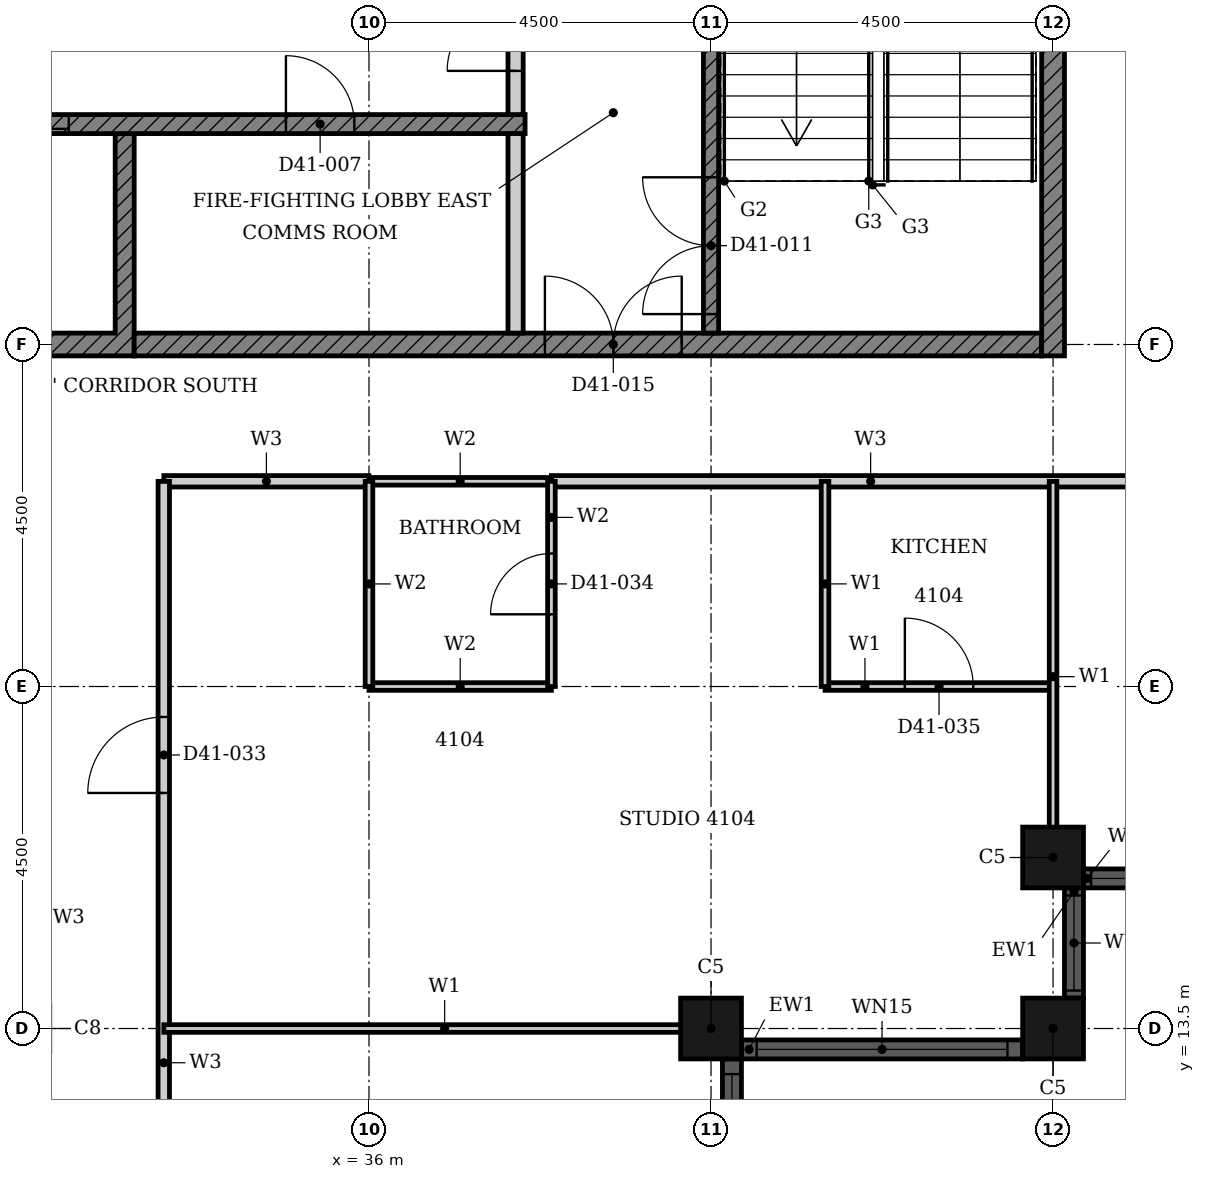
"""IFC4 building model, lengths in metres.
Left out: names, types, materials, properties, quantities, classifications, styles, units other than length and angle.
Written with IfcOpenShell. Run it as: python <this file> out.ifc"""

import sys

from ifc_helpers import new_model, si_unit, direction, frame, frame_2d, origin, origin_2d, place, context, subcontext, project, spatial, polyline, rectangle, hollow_rectangle, outline, extrude, element, fill, save


model = new_model("IFC4")
c1 = context("Model", 3, precision=1e-05, world=origin(), true_north=direction((0.0, 1.0)))
c2 = subcontext(c1, "Body", "Model", "MODEL_VIEW")
j1 = project(units=[si_unit("LENGTHUNIT", "METRE"), si_unit("PLANEANGLEUNIT", "RADIAN")], contexts=[c1])
p1 = place(None, origin())
s1 = spatial("IfcSite", under=j1, at=p1, CompositionType="ELEMENT")
p2 = place(p1, origin())
s2 = spatial("IfcBuilding", under=s1, at=p2, CompositionType="ELEMENT")
p3 = place(p2, frame((0.0, 0.0, 165.4)))
s3 = spatial("IfcBuildingStorey", under=s2, at=p3, CompositionType="ELEMENT", Elevation=165.4)
for number, where, z_axis, x_axis in (
    (1, (40.5, 13.5, 0.0), (0.0, 0.0, 1.0), (1.0, 0.0, 0.0)),
    (2, (45.0, 13.5, 0.0), (0.0, 0.0, 1.0), (1.0, 0.0, 0.0)),
    (3, (45.0, 15.75, 0.0), (0.0, 0.0, 1.0), (1.0, 0.0, 0.0)),
):
    element("IfcColumn", number, at=place(p3, frame(where, z_axis=z_axis, x_axis=x_axis)), inside=s3, PredefinedType="COLUMN", context=c2, shape_type="SweptSolid", body=[
        extrude(hollow_rectangle(XDim=0.8, YDim=0.8, WallThickness=0.025, at=origin_2d()), origin(), (0.0, 0.0, 1.0), 3.7),
    ])
p4 = place(p3, frame((40.775, 4.9, 0.0), z_axis=(0.0, 0.0, 1.0), x_axis=(0.0, 1.0, 0.0)))
e4 = element("IfcWall", 4, at=p4, inside=s3, PredefinedType="SOLIDWALL", context=c2, shape_type="SweptSolid", body=[
    extrude(rectangle(XDim=8.2, YDim=0.25, at=frame_2d((4.1, 0.0))), origin(), (0.0, 0.0, 1.0), 3.7),
])
p5 = place(p4, frame((0.2, 0.0, 0.45)))
e5 = element("IfcOpeningElement", 5, at=p5, cuts=e4, PredefinedType="OPENING", context=c2, shape_type="SweptSolid", body=[
    extrude(rectangle(XDim=3.3, YDim=2.3, at=frame_2d((1.65, 1.15))), frame((0.0, 0.135, 0.0), z_axis=(0.0, -1.0, 0.0), x_axis=(1.0, 0.0, 0.0)), (0.0, 0.0, 1.0), 0.27),
])
p6 = place(p4, frame((4.7, 0.0, 0.45)))
e6 = element("IfcOpeningElement", 6, at=p6, cuts=e4, PredefinedType="OPENING", context=c2, shape_type="SweptSolid", body=[
    extrude(rectangle(XDim=3.3, YDim=2.3, at=frame_2d((1.65, 1.15))), frame((0.0, 0.135, 0.0), z_axis=(0.0, -1.0, 0.0), x_axis=(1.0, 0.0, 0.0)), (0.0, 0.0, 1.0), 0.27),
])
p7 = place(p3, frame((40.9, 13.225, 0.0), z_axis=(0.0, 0.0, 1.0), x_axis=(1.0, 0.0, 0.0)))
e7 = element("IfcWall", 7, at=p7, inside=s3, PredefinedType="SOLIDWALL", context=c2, shape_type="SweptSolid", body=[
    extrude(rectangle(XDim=3.7, YDim=0.25, at=frame_2d((1.85, 0.0))), origin(), (0.0, 0.0, 1.0), 3.7),
])
p8 = place(p7, frame((0.2, 0.0, 0.45)))
e8 = element("IfcOpeningElement", 8, at=p8, cuts=e7, PredefinedType="OPENING", context=c2, shape_type="SweptSolid", body=[
    extrude(rectangle(XDim=3.3, YDim=2.3, at=frame_2d((1.65, 1.15))), frame((0.0, 0.135, 0.0), z_axis=(0.0, -1.0, 0.0), x_axis=(1.0, 0.0, 0.0)), (0.0, 0.0, 1.0), 0.27),
])
p9 = place(p3, frame((45.275, 13.9, 0.0), z_axis=(0.0, 0.0, 1.0), x_axis=(0.0, 1.0, 0.0)))
e9 = element("IfcWall", 9, at=p9, inside=s3, PredefinedType="SOLIDWALL", context=c2, shape_type="SweptSolid", body=[
    extrude(rectangle(XDim=1.45, YDim=0.25, at=frame_2d((0.725, 0.0))), origin(), (0.0, 0.0, 1.0), 3.7),
])
p10 = place(p9, frame((0.1, 0.0, 0.9)))
e10 = element("IfcOpeningElement", 10, at=p10, cuts=e9, PredefinedType="OPENING", context=c2, shape_type="SweptSolid", body=[
    extrude(rectangle(XDim=1.25, YDim=1.85, at=frame_2d((0.625, 0.925))), frame((0.0, 0.135, 0.0), z_axis=(0.0, -1.0, 0.0), x_axis=(1.0, 0.0, 0.0)), (0.0, 0.0, 1.0), 0.27),
])
p11 = place(p3, frame((45.4, 15.475, 0.0), z_axis=(0.0, 0.0, 1.0), x_axis=(1.0, 0.0, 0.0)))
e11 = element("IfcWall", 11, at=p11, inside=s3, PredefinedType="SOLIDWALL", context=c2, shape_type="SweptSolid", body=[
    extrude(rectangle(XDim=1.45, YDim=0.25, at=frame_2d((0.725, 0.0))), origin(), (0.0, 0.0, 1.0), 3.7),
])
p12 = place(p11, frame((0.1, 0.0, 0.9)))
e12 = element("IfcOpeningElement", 12, at=p12, cuts=e11, PredefinedType="OPENING", context=c2, shape_type="SweptSolid", body=[
    extrude(rectangle(XDim=1.25, YDim=1.85, at=frame_2d((0.625, 0.925))), frame((0.0, 0.135, 0.0), z_axis=(0.0, -1.0, 0.0), x_axis=(1.0, 0.0, 0.0)), (0.0, 0.0, 1.0), 0.27),
])
p13 = place(p3, origin())
e13 = element("IfcWall", 13, at=p13, inside=s3, PredefinedType="SHEAR", context=c2, shape_type="SweptSolid", body=[
    extrude(outline(polyline([(27.518, 22.35), (32.911, 22.35), (32.911, 25.275), (32.661, 25.275), (32.661, 22.65), (30.339, 22.65), (30.339, 25.275), (30.089, 25.275), (30.089, 22.65), (27.768, 22.65), (27.768, 25.275), (27.518, 25.275), (27.518, 22.35)])), origin(), (0.0, 0.0, 1.0), 3.4),
])
p14 = place(p3, frame((32.911, 22.5, 0.0), z_axis=(0.0, 0.0, 1.0), x_axis=(1.0, 0.0, 0.0)))
e14 = element("IfcWall", 14, at=p14, inside=s3, PredefinedType="SHEAR", context=c2, shape_type="SweptSolid", body=[
    extrude(rectangle(XDim=11.939, YDim=0.3, at=frame_2d((5.97, 0.0))), origin(), (0.0, 0.0, 1.0), 3.4),
])
p15 = place(p14, frame((5.404, 0.0, 0.0)))
e15 = element("IfcOpeningElement", 15, at=p15, cuts=e14, PredefinedType="OPENING", context=c2, shape_type="SweptSolid", body=[
    extrude(rectangle(XDim=1.8, YDim=2.1, at=frame_2d((0.9, 1.05))), frame((0.0, 0.16, 0.0), z_axis=(0.0, -1.0, 0.0), x_axis=(1.0, 0.0, 0.0)), (0.0, 0.0, 1.0), 0.32),
])
p16 = place(p3, frame((45.0, 22.35, 0.0), z_axis=(0.0, 0.0, 1.0), x_axis=(0.0, 1.0, 0.0)))
e16 = element("IfcWall", 16, at=p16, inside=s3, PredefinedType="SHEAR", context=c2, shape_type="SweptSolid", body=[
    extrude(rectangle(XDim=9.3, YDim=0.3, at=frame_2d((4.65, 0.0))), origin(), (0.0, 0.0, 1.0), 3.4),
])
p17 = place(p3, frame((22.375, 25.4, 0.0), z_axis=(0.0, 0.0, 1.0), x_axis=(1.0, 0.0, 0.0)))
e17 = element("IfcWall", 17, at=p17, inside=s3, PredefinedType="SHEAR", context=c2, shape_type="SweptSolid", body=[
    extrude(rectangle(XDim=15.678, YDim=0.25, at=frame_2d((7.839, 0.0))), origin(), (0.0, 0.0, 1.0), 3.4),
])
p18 = place(p17, frame((8.575, 0.0, 0.0)))
e18 = element("IfcOpeningElement", 18, at=p18, cuts=e17, PredefinedType="OPENING", context=c2, shape_type="SweptSolid", body=[
    extrude(rectangle(XDim=1.1, YDim=2.1, at=frame_2d((0.55, 1.05))), frame((0.0, 0.135, 0.0), z_axis=(0.0, -1.0, 0.0), x_axis=(1.0, 0.0, 0.0)), (0.0, 0.0, 1.0), 0.27),
])
p19 = place(p17, frame((0.861, 0.0, 0.0)))
e19 = element("IfcOpeningElement", 19, at=p19, cuts=e17, PredefinedType="OPENING", context=c2, shape_type="SweptSolid", body=[
    extrude(rectangle(XDim=1.1, YDim=2.1, at=frame_2d((0.55, 1.05))), frame((0.0, 0.135, 0.0), z_axis=(0.0, -1.0, 0.0), x_axis=(1.0, 0.0, 0.0)), (0.0, 0.0, 1.0), 0.27),
])
p20 = place(p17, frame((3.532, 0.0, 0.0)))
e20 = element("IfcOpeningElement", 20, at=p20, cuts=e17, PredefinedType="OPENING", context=c2, shape_type="SweptSolid", body=[
    extrude(rectangle(XDim=0.9, YDim=2.1, at=frame_2d((0.45, 1.05))), frame((0.0, 0.135, 0.0), z_axis=(0.0, -1.0, 0.0), x_axis=(1.0, 0.0, 0.0)), (0.0, 0.0, 1.0), 0.27),
])
p21 = place(p17, frame((12.532, 0.0, 0.0)))
e21 = element("IfcOpeningElement", 21, at=p21, cuts=e17, PredefinedType="OPENING", context=c2, shape_type="SweptSolid", body=[
    extrude(rectangle(XDim=0.9, YDim=2.1, at=frame_2d((0.45, 1.05))), frame((0.0, 0.135, 0.0), z_axis=(0.0, -1.0, 0.0), x_axis=(1.0, 0.0, 0.0)), (0.0, 0.0, 1.0), 0.27),
])
p22 = place(p3, frame((37.928, 22.65, 0.0), z_axis=(0.0, 0.0, 1.0), x_axis=(0.0, 1.0, 0.0)))
e22 = element("IfcWall", 22, at=p22, inside=s3, PredefinedType="PARTITIONING", context=c2, shape_type="SweptSolid", body=[
    extrude(rectangle(XDim=2.625, YDim=0.2, at=frame_2d((1.312, 0.0))), origin(), (0.0, 0.0, 1.0), 3.4),
])
p23 = place(p3, frame((40.5, 22.65, 0.0), z_axis=(0.0, 0.0, 1.0), x_axis=(0.0, 1.0, 0.0)))
e23 = element("IfcWall", 23, at=p23, inside=s3, PredefinedType="SHEAR", context=c2, shape_type="SweptSolid", body=[
    extrude(rectangle(XDim=5.825, YDim=0.2, at=frame_2d((2.913, 0.0))), origin(), (0.0, 0.0, 1.0), 3.4),
])
p24 = place(p23, frame((0.25, 0.0, 0.0)))
e24 = element("IfcOpeningElement", 24, at=p24, cuts=e23, PredefinedType="OPENING", context=c2, shape_type="SweptSolid", body=[
    extrude(rectangle(XDim=1.8, YDim=2.1, at=frame_2d((0.9, 1.05))), frame((0.0, 0.11, 0.0), z_axis=(0.0, -1.0, 0.0), x_axis=(1.0, 0.0, 0.0)), (0.0, 0.0, 1.0), 0.22),
])
p25 = place(p3, frame((37.928, 25.525, 0.0), z_axis=(0.0, 0.0, 1.0), x_axis=(0.0, 1.0, 0.0)))
e25 = element("IfcWall", 25, at=p25, inside=s3, PredefinedType="PARTITIONING", context=c2, shape_type="SweptSolid", body=[
    extrude(rectangle(XDim=2.95, YDim=0.2, at=frame_2d((1.475, 0.0))), origin(), (0.0, 0.0, 1.0), 3.4),
])
p26 = place(p25, frame((0.575, 0.0, 0.0)))
e26 = element("IfcOpeningElement", 26, at=p26, cuts=e25, PredefinedType="OPENING", context=c2, shape_type="SweptSolid", body=[
    extrude(rectangle(XDim=1.8, YDim=2.1, at=frame_2d((0.9, 1.05))), frame((0.0, 0.11, 0.0), z_axis=(0.0, -1.0, 0.0), x_axis=(1.0, 0.0, 0.0)), (0.0, 0.0, 1.0), 0.22),
])
p27 = place(p3, frame((33.301, 20.7, 0.0), z_axis=(0.0, 0.0, 1.0), x_axis=(1.0, 0.0, 0.0)))
e27 = element("IfcWall", 27, at=p27, inside=s3, PredefinedType="PARTITIONING", context=c2, shape_type="SweptSolid", body=[
    extrude(rectangle(XDim=2.698, YDim=0.15, at=frame_2d((1.349, 0.0))), origin(), (0.0, 0.0, 1.0), 3.4),
])
p28 = place(p3, frame((38.4, 20.7, 0.0), z_axis=(0.0, 0.0, 1.0), x_axis=(1.0, 0.0, 0.0)))
e28 = element("IfcWall", 28, at=p28, inside=s3, PredefinedType="PARTITIONING", context=c2, shape_type="SweptSolid", body=[
    extrude(rectangle(XDim=8.4, YDim=0.15, at=frame_2d((4.2, 0.0))), origin(), (0.0, 0.0, 1.0), 3.4),
])
p29 = place(p3, frame((33.3, 4.5, 0.0), z_axis=(0.0, 0.0, 1.0), x_axis=(0.0, 1.0, 0.0)))
e29 = element("IfcWall", 29, at=p29, inside=s3, PredefinedType="PARTITIONING", context=c2, shape_type="SweptSolid", body=[
    extrude(rectangle(XDim=16.199, YDim=0.15, at=frame_2d((8.1, 0.0))), origin(), (0.0, 0.0, 1.0), 3.4),
])
p30 = place(p29, frame((12.099, 0.0, 0.0)))
e30 = element("IfcOpeningElement", 30, at=p30, cuts=e29, PredefinedType="OPENING", context=c2, shape_type="SweptSolid", body=[
    extrude(rectangle(XDim=1.0, YDim=2.2, at=frame_2d((0.5, 1.1))), frame((0.0, 0.085, 0.0), z_axis=(0.0, -1.0, 0.0), x_axis=(1.0, 0.0, 0.0)), (0.0, 0.0, 1.0), 0.17),
])
p31 = place(p29, frame((4.0, 0.0, 0.0)))
e31 = element("IfcOpeningElement", 31, at=p31, cuts=e29, PredefinedType="OPENING", context=c2, shape_type="SweptSolid", body=[
    extrude(rectangle(XDim=1.0, YDim=2.1, at=frame_2d((0.5, 1.05))), frame((0.0, 0.085, 0.0), z_axis=(0.0, -1.0, 0.0), x_axis=(1.0, 0.0, 0.0)), (0.0, 0.0, 1.0), 0.17),
])
p32 = place(p3, frame((33.301, 13.5, 0.0), z_axis=(0.0, 0.0, 1.0), x_axis=(1.0, 0.0, 0.0)))
e32 = element("IfcWall", 32, at=p32, inside=s3, PredefinedType="PARTITIONING", context=c2, shape_type="SweptSolid", body=[
    extrude(rectangle(XDim=7.389, YDim=0.1, at=frame_2d((3.694, 0.0))), origin(), (0.0, 0.0, 1.0), 2.48),
])
p33 = place(p3, frame((42.0, 18.0, 0.0), z_axis=(0.0, 0.0, 1.0), x_axis=(1.0, 0.0, 0.0)))
e33 = element("IfcWall", 33, at=p33, inside=s3, PredefinedType="PARTITIONING", context=c2, shape_type="SweptSolid", body=[
    extrude(rectangle(XDim=3.0, YDim=0.1, at=frame_2d((1.5, 0.0))), origin(), (0.0, 0.0, 1.0), 3.4),
])
p34 = place(p33, frame((1.05, 0.0, 0.0)))
e34 = element("IfcOpeningElement", 34, at=p34, cuts=e33, PredefinedType="OPENING", context=c2, shape_type="SweptSolid", body=[
    extrude(rectangle(XDim=0.9, YDim=2.1, at=frame_2d((0.45, 1.05))), frame((0.0, 0.06, 0.0), z_axis=(0.0, -1.0, 0.0), x_axis=(1.0, 0.0, 0.0)), (0.0, 0.0, 1.0), 0.12),
])
p35 = place(p3, frame((42.0, 18.0, 0.0), z_axis=(0.0, 0.0, 1.0), x_axis=(0.0, 1.0, 0.0)))
e35 = element("IfcWall", 35, at=p35, inside=s3, PredefinedType="PARTITIONING", context=c2, shape_type="SweptSolid", body=[
    extrude(rectangle(XDim=2.7, YDim=0.1, at=frame_2d((1.35, 0.0))), origin(), (0.0, 0.0, 1.0), 3.4),
])
p36 = place(p3, frame((45.0, 15.56, 0.0), z_axis=(0.0, 0.0, 1.0), x_axis=(0.0, 1.0, 0.0)))
e36 = element("IfcWall", 36, at=p36, inside=s3, PredefinedType="PARTITIONING", context=c2, shape_type="SweptSolid", body=[
    extrude(rectangle(XDim=5.139, YDim=0.1, at=frame_2d((2.569, 0.0))), origin(), (0.0, 0.0, 1.0), 3.4),
])
for number, where, z_axis, x_axis in (
    (37, (36.0, 18.0, 0.0), (0.0, 0.0, 1.0), (1.0, 0.0, 0.0)),
    (38, (36.0, 20.7, 0.0), (0.0, 0.0, 1.0), (1.0, 0.0, 0.0)),
):
    element("IfcWall", number, at=place(p3, frame(where, z_axis=z_axis, x_axis=x_axis)), inside=s3, PredefinedType="PARTITIONING", context=c2, shape_type="SweptSolid", body=[
        extrude(rectangle(XDim=2.4, YDim=0.1, at=frame_2d((1.2, 0.0))), origin(), (0.0, 0.0, 1.0), 3.4),
    ])
p37 = place(p3, frame((36.0, 18.0, 0.0), z_axis=(0.0, 0.0, 1.0), x_axis=(0.0, 1.0, 0.0)))
e39 = element("IfcWall", 39, at=p37, inside=s3, PredefinedType="PARTITIONING", context=c2, shape_type="SweptSolid", body=[
    extrude(rectangle(XDim=2.699, YDim=0.1, at=frame_2d((1.35, 0.0))), origin(), (0.0, 0.0, 1.0), 3.4),
])
p38 = place(p3, frame((38.4, 18.0, 0.0), z_axis=(0.0, 0.0, 1.0), x_axis=(0.0, 1.0, 0.0)))
e40 = element("IfcWall", 40, at=p38, inside=s3, PredefinedType="PARTITIONING", context=c2, shape_type="SweptSolid", body=[
    extrude(rectangle(XDim=2.7, YDim=0.1, at=frame_2d((1.35, 0.0))), origin(), (0.0, 0.0, 1.0), 3.4),
])
p39 = place(p38, frame((0.95, 0.0, 0.0)))
e41 = element("IfcOpeningElement", 41, at=p39, cuts=e40, PredefinedType="OPENING", context=c2, shape_type="SweptSolid", body=[
    extrude(rectangle(XDim=0.8, YDim=2.1, at=frame_2d((0.4, 1.05))), frame((0.0, 0.06, 0.0), z_axis=(0.0, -1.0, 0.0), x_axis=(1.0, 0.0, 0.0)), (0.0, 0.0, 1.0), 0.12),
])
p40 = place(p6, origin())
e42 = element("IfcWindow", 42, at=p40, inside=s3, PartitioningType="SINGLE_PANEL", PredefinedType="WINDOW", context=c2, shape_type="SweptSolid", body=[
    extrude(rectangle(XDim=3.3, YDim=2.3, at=frame_2d((1.65, 1.15))), frame((0.0, 0.03, 0.0), z_axis=(0.0, -1.0, 0.0), x_axis=(1.0, 0.0, 0.0)), (0.0, 0.0, 1.0), 0.06),
])
fill(e6, e42)
p41 = place(p8, origin())
e43 = element("IfcWindow", 43, at=p41, inside=s3, PartitioningType="SINGLE_PANEL", PredefinedType="WINDOW", context=c2, shape_type="SweptSolid", body=[
    extrude(rectangle(XDim=3.3, YDim=2.3, at=frame_2d((1.65, 1.15))), frame((0.0, 0.03, 0.0), z_axis=(0.0, -1.0, 0.0), x_axis=(1.0, 0.0, 0.0)), (0.0, 0.0, 1.0), 0.06),
])
fill(e8, e43)
p42 = place(p10, origin())
e44 = element("IfcWindow", 44, at=p42, inside=s3, PartitioningType="SINGLE_PANEL", PredefinedType="WINDOW", context=c2, shape_type="SweptSolid", body=[
    extrude(rectangle(XDim=1.25, YDim=1.85, at=frame_2d((0.625, 0.925))), frame((0.0, 0.03, 0.0), z_axis=(0.0, -1.0, 0.0), x_axis=(1.0, 0.0, 0.0)), (0.0, 0.0, 1.0), 0.06),
])
fill(e10, e44)
p43 = place(p12, origin())
e45 = element("IfcWindow", 45, at=p43, inside=s3, PartitioningType="SINGLE_PANEL", PredefinedType="WINDOW", context=c2, shape_type="SweptSolid", body=[
    extrude(rectangle(XDim=1.25, YDim=1.85, at=frame_2d((0.625, 0.925))), frame((0.0, 0.03, 0.0), z_axis=(0.0, -1.0, 0.0), x_axis=(1.0, 0.0, 0.0)), (0.0, 0.0, 1.0), 0.06),
])
fill(e12, e45)
p44 = place(p18, origin())
e46 = element("IfcDoor", 46, at=p44, inside=s3, OperationType="DOUBLE_DOOR_SLIDING", PredefinedType="DOOR", context=c2, shape_type="SweptSolid", body=[
    extrude(rectangle(XDim=1.1, YDim=2.1, at=frame_2d((0.55, 1.05))), frame((0.0, 0.025, 0.0), z_axis=(0.0, -1.0, 0.0), x_axis=(1.0, 0.0, 0.0)), (0.0, 0.0, 1.0), 0.05),
])
fill(e18, e46)
p45 = place(p21, origin())
e47 = element("IfcDoor", 47, at=p45, inside=s3, OperationType="SINGLE_SWING_LEFT", PredefinedType="DOOR", context=c2, shape_type="SweptSolid", body=[
    extrude(rectangle(XDim=0.9, YDim=2.1, at=frame_2d((0.45, 1.05))), frame((0.0, 0.025, 0.0), z_axis=(0.0, -1.0, 0.0), x_axis=(1.0, 0.0, 0.0)), (0.0, 0.0, 1.0), 0.05),
])
fill(e21, e47)
p46 = place(p24, origin())
e48 = element("IfcDoor", 48, at=p46, inside=s3, OperationType="DOUBLE_DOOR_SINGLE_SWING", PredefinedType="DOOR", context=c2, shape_type="SweptSolid", body=[
    extrude(rectangle(XDim=1.8, YDim=2.1, at=frame_2d((0.9, 1.05))), frame((0.0, 0.025, 0.0), z_axis=(0.0, -1.0, 0.0), x_axis=(1.0, 0.0, 0.0)), (0.0, 0.0, 1.0), 0.05),
])
fill(e24, e48)
p47 = place(p26, origin())
e49 = element("IfcDoor", 49, at=p47, inside=s3, OperationType="DOUBLE_DOOR_SINGLE_SWING", PredefinedType="DOOR", context=c2, shape_type="SweptSolid", body=[
    extrude(rectangle(XDim=1.8, YDim=2.1, at=frame_2d((0.9, 1.05))), frame((0.0, 0.025, 0.0), z_axis=(0.0, -1.0, 0.0), x_axis=(1.0, 0.0, 0.0)), (0.0, 0.0, 1.0), 0.05),
])
fill(e26, e49)
p48 = place(p15, origin())
e50 = element("IfcDoor", 50, at=p48, inside=s3, OperationType="DOUBLE_DOOR_SINGLE_SWING", PredefinedType="DOOR", context=c2, shape_type="SweptSolid", body=[
    extrude(rectangle(XDim=1.8, YDim=2.1, at=frame_2d((0.9, 1.05))), frame((0.0, 0.025, 0.0), z_axis=(0.0, -1.0, 0.0), x_axis=(1.0, 0.0, 0.0)), (0.0, 0.0, 1.0), 0.05),
])
fill(e15, e50)
p49 = place(p30, origin())
e51 = element("IfcDoor", 51, at=p49, inside=s3, OperationType="SINGLE_SWING_RIGHT", PredefinedType="DOOR", context=c2, shape_type="SweptSolid", body=[
    extrude(rectangle(XDim=1.0, YDim=2.2, at=frame_2d((0.5, 1.1))), frame((0.0, 0.025, 0.0), z_axis=(0.0, -1.0, 0.0), x_axis=(1.0, 0.0, 0.0)), (0.0, 0.0, 1.0), 0.05),
])
fill(e30, e51)
p50 = place(p39, origin())
e52 = element("IfcDoor", 52, at=p50, inside=s3, OperationType="SINGLE_SWING_LEFT", PredefinedType="DOOR", context=c2, shape_type="SweptSolid", body=[
    extrude(rectangle(XDim=0.8, YDim=2.1, at=frame_2d((0.4, 1.05))), frame((0.0, 0.025, 0.0), z_axis=(0.0, -1.0, 0.0), x_axis=(1.0, 0.0, 0.0)), (0.0, 0.0, 1.0), 0.05),
])
fill(e41, e52)
p51 = place(p34, origin())
e53 = element("IfcDoor", 53, at=p51, inside=s3, OperationType="SINGLE_SWING_LEFT", PredefinedType="DOOR", context=c2, shape_type="SweptSolid", body=[
    extrude(rectangle(XDim=0.9, YDim=2.1, at=frame_2d((0.45, 1.05))), frame((0.0, 0.025, 0.0), z_axis=(0.0, -1.0, 0.0), x_axis=(1.0, 0.0, 0.0)), (0.0, 0.0, 1.0), 0.05),
])
fill(e34, e53)
save(model, sys.argv[1])
